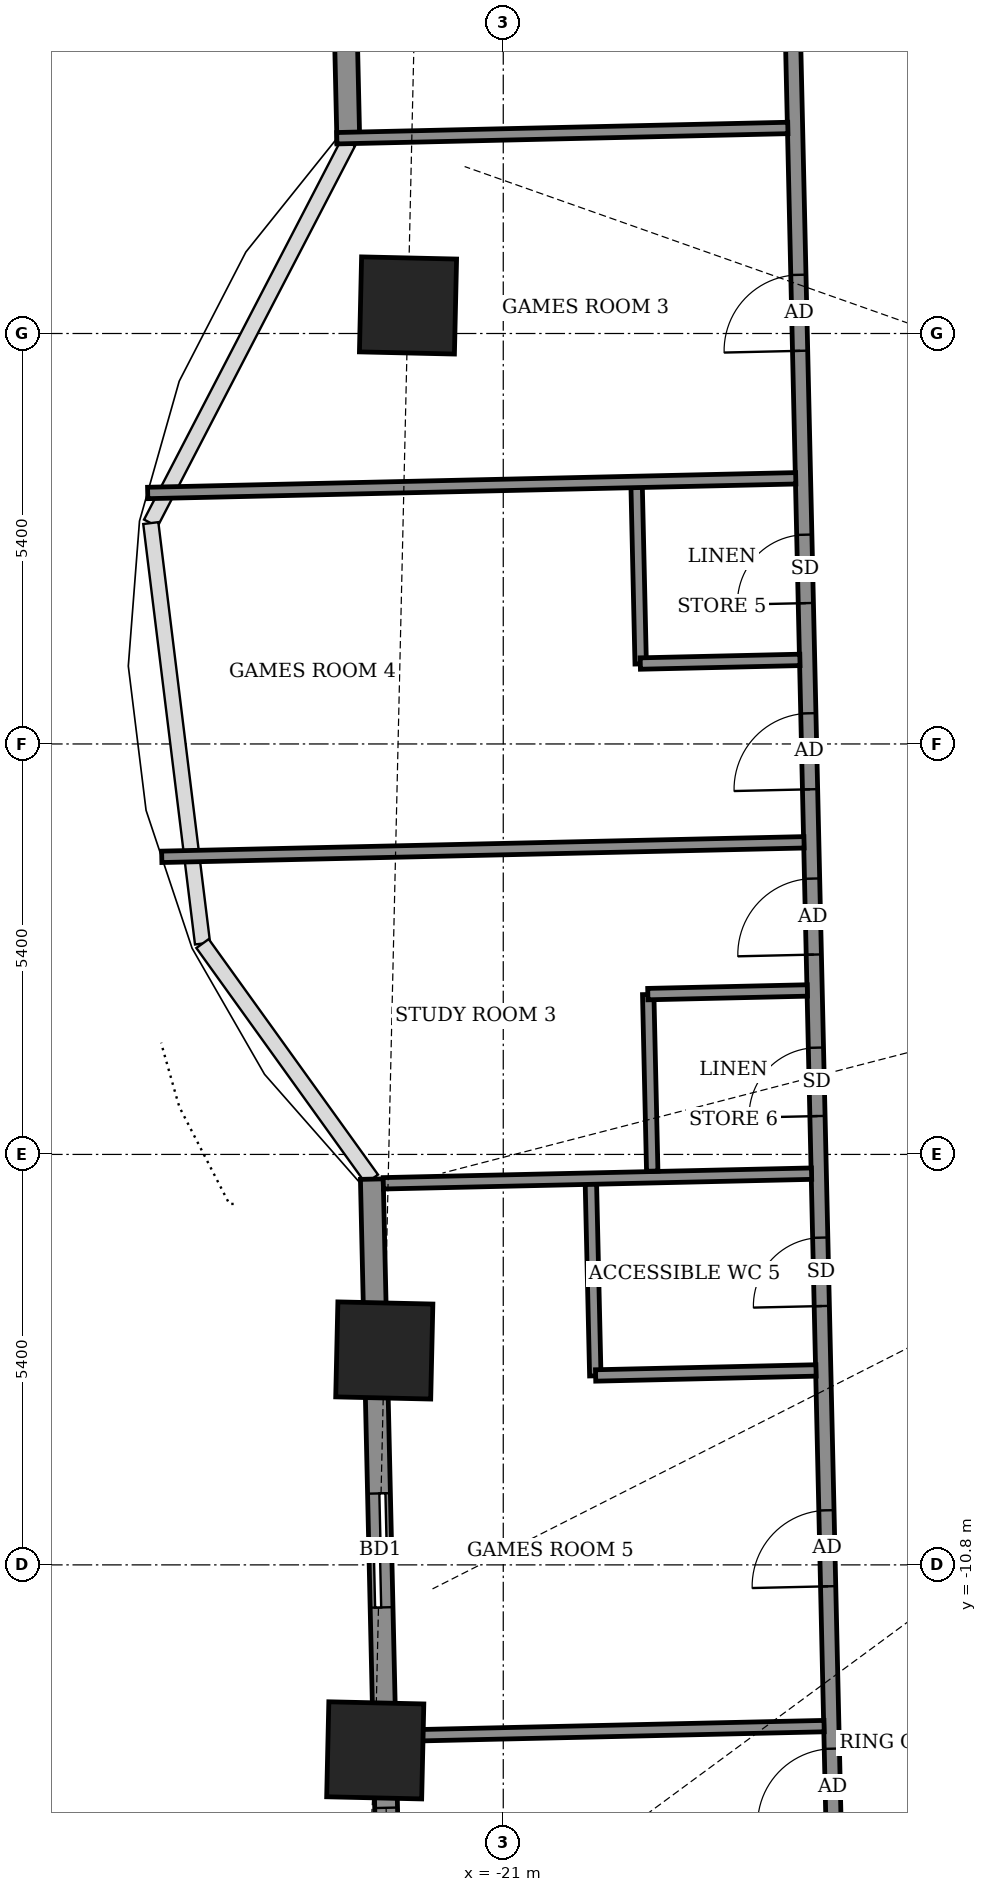
"""IFC4 building model, lengths in metres.
Left out: names, types, materials, properties, quantities, classifications, styles, units other than length and angle.
Written with IfcOpenShell. Run it as: python <this file> out.ifc"""

import sys

from ifc_helpers import new_model, si_unit, direction, frame, frame_2d, origin, origin_2d, place, context, subcontext, project, spatial, rectangle, extrude, element, fill, save


model = new_model("IFC4")
c1 = context("Model", 3, precision=1e-05, world=origin(), true_north=direction((0.0, 1.0)))
c2 = subcontext(c1, "Body", "Model", "MODEL_VIEW")
j1 = project(units=[si_unit("LENGTHUNIT", "METRE"), si_unit("PLANEANGLEUNIT", "RADIAN")], contexts=[c1])
p1 = place(None, origin())
s1 = spatial("IfcSite", under=j1, at=p1, CompositionType="ELEMENT")
p2 = place(p1, origin())
s2 = spatial("IfcBuilding", under=s1, at=p2, CompositionType="ELEMENT")
p3 = place(p2, frame((0.0, 0.0, 170.7)))
s3 = spatial("IfcBuildingStorey", under=s2, at=p3, CompositionType="ELEMENT", Elevation=170.7)
for number, where, z_axis, x_axis in (
    (1, (-22.565, -7.979, -0.55), (0.0, 0.0, 1.0), (-0.023, -1.0, 0.0)),
    (2, (-22.684, -13.24, -0.55), (0.0, 0.0, 1.0), (-0.023, -1.0, 0.0)),
    (3, (-22.253, 5.769, -0.55), (0.0, 0.0, 1.0), (-0.023, -1.0, 0.0)),
):
    element("IfcColumn", number, at=place(p3, frame(where, z_axis=z_axis, x_axis=x_axis)), inside=s3, PredefinedType="COLUMN", context=c2, shape_type="SweptSolid", body=[
        extrude(rectangle(XDim=1.25, YDim=1.25, at=origin_2d()), origin(), (0.0, 0.0, 1.0), 4.6),
    ])
p4 = place(p3, frame((-23.275, 18.34, 0.0), z_axis=(0.0, 0.0, 1.0), x_axis=(0.022705985163, -0.999742185885, 0.0)))
e4 = element("IfcWall", 4, at=p4, inside=s3, PredefinedType="SOLIDWALL", context=c2, shape_type="SweptSolid", body=[
    extrude(rectangle(XDim=10.43, YDim=0.3, at=frame_2d((5.215, 0.0))), origin(), (0.0, 0.0, 1.0), 2.85),
])
p5 = place(p4, frame((0.312, 0.0, 0.0)))
e5 = element("IfcOpeningElement", 5, at=p5, cuts=e4, PredefinedType="OPENING", context=c2, shape_type="SweptSolid", body=[
    extrude(rectangle(XDim=1.5, YDim=2.4, at=frame_2d((0.75, 1.2))), frame((0.0, 0.16, 0.0), z_axis=(0.0, -1.0, 0.0), x_axis=(1.0, 0.0, 0.0)), (0.0, 0.0, 1.0), 0.32),
])
p6 = place(p4, frame((4.136, 0.0, 0.9)))
e6 = element("IfcOpeningElement", 6, at=p6, cuts=e4, PredefinedType="OPENING", context=c2, shape_type="SweptSolid", body=[
    extrude(rectangle(XDim=2.4, YDim=1.5, at=frame_2d((1.2, 0.75))), frame((0.0, 0.16, 0.0), z_axis=(0.0, -1.0, 0.0), x_axis=(1.0, 0.0, 0.0)), (0.0, 0.0, 1.0), 0.32),
])
p7 = place(p3, frame((-22.729, -5.725, 0.0), z_axis=(0.0, 0.0, 1.0), x_axis=(0.022726014582, -0.999741730779, 0.0)))
e7 = element("IfcWall", 7, at=p7, inside=s3, PredefinedType="SOLIDWALL", context=c2, shape_type="SweptSolid", body=[
    extrude(rectangle(XDim=10.829, YDim=0.3, at=frame_2d((5.414, 0.0))), origin(), (0.0, 0.0, 1.0), 2.75),
])
p8 = place(p7, frame((4.136, 0.0, 0.0)))
e8 = element("IfcOpeningElement", 8, at=p8, cuts=e7, PredefinedType="OPENING", context=c2, shape_type="SweptSolid", body=[
    extrude(rectangle(XDim=1.5, YDim=2.4, at=frame_2d((0.75, 1.2))), frame((0.0, 0.16, 0.0), z_axis=(0.0, -1.0, 0.0), x_axis=(1.0, 0.0, 0.0)), (0.0, 0.0, 1.0), 0.32),
])
p9 = place(p7, frame((8.273, 0.0, 0.9)))
e9 = element("IfcOpeningElement", 9, at=p9, cuts=e7, PredefinedType="OPENING", context=c2, shape_type="SweptSolid", body=[
    extrude(rectangle(XDim=2.4, YDim=1.5, at=frame_2d((1.2, 0.75))), frame((0.0, 0.16, 0.0), z_axis=(0.0, -1.0, 0.0), x_axis=(1.0, 0.0, 0.0)), (0.0, 0.0, 1.0), 0.32),
])
p10 = place(p3, frame((-25.421, -8.966, 0.0), z_axis=(0.0, 0.0, 1.0), x_axis=(-0.022675106248, 0.999742886725, 0.0)))
e10 = element("IfcWall", 10, at=p10, inside=s3, PredefinedType="USERDEFINED", context=c2, shape_type="SweptSolid", body=[
    extrude(rectangle(XDim=2.875, YDim=0.55, at=frame_2d((1.438, 0.0))), origin(), (0.0, 0.0, 1.0), 0.8),
])
p11 = place(p3, frame((-16.65, -14.418, 0.0), z_axis=(0.0, 0.0, 1.0), x_axis=(-0.022695485329, 0.9997424243, 0.0)))
e11 = element("IfcWall", 11, at=p11, inside=s3, PredefinedType="PARTITIONING", context=c2, shape_type="SweptSolid", body=[
    extrude(rectangle(XDim=31.024, YDim=0.2, at=frame_2d((15.512, 0.0))), origin(), (0.0, 0.0, 1.0), 2.75),
])
p12 = place(p11, frame((0.2, 0.0, 0.0)))
e12 = element("IfcOpeningElement", 12, at=p12, cuts=e11, PredefinedType="OPENING", context=c2, shape_type="SweptSolid", body=[
    extrude(rectangle(XDim=1.0, YDim=2.1, at=frame_2d((0.5, 1.05))), frame((0.0, 0.11, 0.0), z_axis=(0.0, -1.0, 0.0), x_axis=(1.0, 0.0, 0.0)), (0.0, 0.0, 1.0), 0.22),
])
p13 = place(p11, frame((25.525, 0.0, 0.0)))
e13 = element("IfcOpeningElement", 13, at=p13, cuts=e11, PredefinedType="OPENING", context=c2, shape_type="SweptSolid", body=[
    extrude(rectangle(XDim=1.0, YDim=2.1, at=frame_2d((0.5, 1.05))), frame((0.0, 0.11, 0.0), z_axis=(0.0, -1.0, 0.0), x_axis=(1.0, 0.0, 0.0)), (0.0, 0.0, 1.0), 0.22),
])
p14 = place(p11, frame((19.595, 0.0, 0.0)))
e14 = element("IfcOpeningElement", 14, at=p14, cuts=e11, PredefinedType="OPENING", context=c2, shape_type="SweptSolid", body=[
    extrude(rectangle(XDim=1.0, YDim=2.1, at=frame_2d((0.5, 1.05))), frame((0.0, 0.11, 0.0), z_axis=(0.0, -1.0, 0.0), x_axis=(1.0, 0.0, 0.0)), (0.0, 0.0, 1.0), 0.22),
])
p15 = place(p11, frame((13.825, 0.0, 0.0)))
e15 = element("IfcOpeningElement", 15, at=p15, cuts=e11, PredefinedType="OPENING", context=c2, shape_type="SweptSolid", body=[
    extrude(rectangle(XDim=1.0, YDim=2.1, at=frame_2d((0.5, 1.05))), frame((0.0, 0.11, 0.0), z_axis=(0.0, -1.0, 0.0), x_axis=(1.0, 0.0, 0.0)), (0.0, 0.0, 1.0), 0.22),
])
p16 = place(p11, frame((16.275, 0.0, 0.0)))
e16 = element("IfcOpeningElement", 16, at=p16, cuts=e11, PredefinedType="OPENING", context=c2, shape_type="SweptSolid", body=[
    extrude(rectangle(XDim=0.9, YDim=2.1, at=frame_2d((0.45, 1.05))), frame((0.0, 0.11, 0.0), z_axis=(0.0, -1.0, 0.0), x_axis=(1.0, 0.0, 0.0)), (0.0, 0.0, 1.0), 0.22),
])
p17 = place(p11, frame((11.65, 0.0, 0.0)))
e17 = element("IfcOpeningElement", 17, at=p17, cuts=e11, PredefinedType="OPENING", context=c2, shape_type="SweptSolid", body=[
    extrude(rectangle(XDim=1.0, YDim=2.1, at=frame_2d((0.5, 1.05))), frame((0.0, 0.11, 0.0), z_axis=(0.0, -1.0, 0.0), x_axis=(1.0, 0.0, 0.0)), (0.0, 0.0, 1.0), 0.22),
])
p18 = place(p11, frame((9.525, 0.0, 0.0)))
e18 = element("IfcOpeningElement", 18, at=p18, cuts=e11, PredefinedType="OPENING", context=c2, shape_type="SweptSolid", body=[
    extrude(rectangle(XDim=0.9, YDim=2.1, at=frame_2d((0.45, 1.05))), frame((0.0, 0.11, 0.0), z_axis=(0.0, -1.0, 0.0), x_axis=(1.0, 0.0, 0.0)), (0.0, 0.0, 1.0), 0.22),
])
p19 = place(p11, frame((3.337, 0.0, 0.0)))
e19 = element("IfcOpeningElement", 19, at=p19, cuts=e11, PredefinedType="OPENING", context=c2, shape_type="SweptSolid", body=[
    extrude(rectangle(XDim=1.0, YDim=2.1, at=frame_2d((0.5, 1.05))), frame((0.0, 0.11, 0.0), z_axis=(0.0, -1.0, 0.0), x_axis=(1.0, 0.0, 0.0)), (0.0, 0.0, 1.0), 0.22),
])
p20 = place(p11, frame((7.025, 0.0, 0.0)))
e20 = element("IfcOpeningElement", 20, at=p20, cuts=e11, PredefinedType="OPENING", context=c2, shape_type="SweptSolid", body=[
    extrude(rectangle(XDim=0.9, YDim=2.1, at=frame_2d((0.45, 1.05))), frame((0.0, 0.11, 0.0), z_axis=(0.0, -1.0, 0.0), x_axis=(1.0, 0.0, 0.0)), (0.0, 0.0, 1.0), 0.22),
])
p21 = place(p3, frame((-16.645, -14.418, 0.0), z_axis=(0.0, 0.0, 1.0), x_axis=(0.999742564802, 0.022689295346, 0.0)))
e21 = element("IfcWall", 21, at=p21, inside=s3, PredefinedType="PARTITIONING", context=c2, shape_type="SweptSolid", body=[
    extrude(rectangle(XDim=40.587, YDim=0.2, at=frame_2d((20.294, 0.0))), origin(), (0.0, 0.0, 1.0), 2.55),
])
p22 = place(p21, frame((4.965, 0.0, 0.0)))
e22 = element("IfcOpeningElement", 22, at=p22, cuts=e21, PredefinedType="OPENING", context=c2, shape_type="SweptSolid", body=[
    extrude(rectangle(XDim=0.9, YDim=2.1, at=frame_2d((0.45, 1.05))), frame((0.0, 0.11, 0.0), z_axis=(0.0, -1.0, 0.0), x_axis=(1.0, 0.0, 0.0)), (0.0, 0.0, 1.0), 0.22),
])
p23 = place(p21, frame((10.44, 0.0, 0.0)))
e23 = element("IfcOpeningElement", 23, at=p23, cuts=e21, PredefinedType="OPENING", context=c2, shape_type="SweptSolid", body=[
    extrude(rectangle(XDim=1.0, YDim=2.1, at=frame_2d((0.5, 1.05))), frame((0.0, 0.11, 0.0), z_axis=(0.0, -1.0, 0.0), x_axis=(1.0, 0.0, 0.0)), (0.0, 0.0, 1.0), 0.22),
])
p24 = place(p21, frame((7.465, 0.0, 0.0)))
e24 = element("IfcOpeningElement", 24, at=p24, cuts=e21, PredefinedType="OPENING", context=c2, shape_type="SweptSolid", body=[
    extrude(rectangle(XDim=0.9, YDim=2.1, at=frame_2d((0.45, 1.05))), frame((0.0, 0.11, 0.0), z_axis=(0.0, -1.0, 0.0), x_axis=(1.0, 0.0, 0.0)), (0.0, 0.0, 1.0), 0.22),
])
p25 = place(p21, frame((13.515, 0.0, 0.0)))
e25 = element("IfcOpeningElement", 25, at=p25, cuts=e21, PredefinedType="OPENING", context=c2, shape_type="SweptSolid", body=[
    extrude(rectangle(XDim=0.9, YDim=2.1, at=frame_2d((0.45, 1.05))), frame((0.0, 0.11, 0.0), z_axis=(0.0, -1.0, 0.0), x_axis=(1.0, 0.0, 0.0)), (0.0, 0.0, 1.0), 0.22),
])
p26 = place(p21, frame((20.915, 0.0, 0.0)))
e26 = element("IfcOpeningElement", 26, at=p26, cuts=e21, PredefinedType="OPENING", context=c2, shape_type="SweptSolid", body=[
    extrude(rectangle(XDim=0.9, YDim=2.1, at=frame_2d((0.45, 1.05))), frame((0.0, 0.11, 0.0), z_axis=(0.0, -1.0, 0.0), x_axis=(1.0, 0.0, 0.0)), (0.0, 0.0, 1.0), 0.22),
])
p27 = place(p21, frame((23.24, 0.0, 0.0)))
e27 = element("IfcOpeningElement", 27, at=p27, cuts=e21, PredefinedType="OPENING", context=c2, shape_type="SweptSolid", body=[
    extrude(rectangle(XDim=1.0, YDim=2.1, at=frame_2d((0.5, 1.05))), frame((0.0, 0.11, 0.0), z_axis=(0.0, -1.0, 0.0), x_axis=(1.0, 0.0, 0.0)), (0.0, 0.0, 1.0), 0.22),
])
p28 = place(p21, frame((25.665, 0.0, 0.0)))
e28 = element("IfcOpeningElement", 28, at=p28, cuts=e21, PredefinedType="OPENING", context=c2, shape_type="SweptSolid", body=[
    extrude(rectangle(XDim=0.9, YDim=2.1, at=frame_2d((0.45, 1.05))), frame((0.0, 0.11, 0.0), z_axis=(0.0, -1.0, 0.0), x_axis=(1.0, 0.0, 0.0)), (0.0, 0.0, 1.0), 0.22),
])
p29 = place(p21, frame((31.265, 0.0, 0.0)))
e29 = element("IfcOpeningElement", 29, at=p29, cuts=e21, PredefinedType="OPENING", context=c2, shape_type="SweptSolid", body=[
    extrude(rectangle(XDim=1.0, YDim=2.1, at=frame_2d((0.5, 1.05))), frame((0.0, 0.11, 0.0), z_axis=(0.0, -1.0, 0.0), x_axis=(1.0, 0.0, 0.0)), (0.0, 0.0, 1.0), 0.22),
])
p30 = place(p21, frame((28.265, 0.0, 0.0)))
e30 = element("IfcOpeningElement", 30, at=p30, cuts=e21, PredefinedType="OPENING", context=c2, shape_type="SweptSolid", body=[
    extrude(rectangle(XDim=0.9, YDim=2.1, at=frame_2d((0.45, 1.05))), frame((0.0, 0.11, 0.0), z_axis=(0.0, -1.0, 0.0), x_axis=(1.0, 0.0, 0.0)), (0.0, 0.0, 1.0), 0.22),
])
p31 = place(p21, frame((39.18, 0.0, 0.0)))
e31 = element("IfcOpeningElement", 31, at=p31, cuts=e21, PredefinedType="OPENING", context=c2, shape_type="SweptSolid", body=[
    extrude(rectangle(XDim=1.0, YDim=2.1, at=frame_2d((0.5, 1.05))), frame((0.0, 0.11, 0.0), z_axis=(0.0, -1.0, 0.0), x_axis=(1.0, 0.0, 0.0)), (0.0, 0.0, 1.0), 0.22),
])
p32 = place(p21, frame((34.365, 0.0, 0.0)))
e32 = element("IfcOpeningElement", 32, at=p32, cuts=e21, PredefinedType="OPENING", context=c2, shape_type="SweptSolid", body=[
    extrude(rectangle(XDim=0.9, YDim=2.1, at=frame_2d((0.45, 1.05))), frame((0.0, 0.11, 0.0), z_axis=(0.0, -1.0, 0.0), x_axis=(1.0, 0.0, 0.0)), (0.0, 0.0, 1.0), 0.22),
])
p33 = place(p3, frame((-22.713, -13.055, 0.0), z_axis=(0.0, 0.0, 1.0), x_axis=(0.999744989952, 0.022582184714, 0.0)))
e33 = element("IfcWall", 33, at=p33, inside=s3, PredefinedType="PARTITIONING", context=c2, shape_type="SweptSolid", body=[
    extrude(rectangle(XDim=5.935, YDim=0.15, at=frame_2d((2.968, 0.0))), origin(), (0.0, 0.0, 1.0), 2.85),
])
p34 = place(p3, frame((-19.789, -8.313, 0.0), z_axis=(0.0, 0.0, 1.0), x_axis=(-0.022910248851, 0.999737525802, 0.0)))
e34 = element("IfcWall", 34, at=p34, inside=s3, PredefinedType="PARTITIONING", context=c2, shape_type="SweptSolid", body=[
    extrude(rectangle(XDim=2.526, YDim=0.15, at=frame_2d((1.263, 0.0))), origin(), (0.0, 0.0, 1.0), 2.85),
])
p35 = place(p3, frame((-19.785, -8.308, 0.0), z_axis=(0.0, 0.0, 1.0), x_axis=(0.999739832865, 0.022809352981, 0.0)))
e35 = element("IfcWall", 35, at=p35, inside=s3, PredefinedType="PARTITIONING", context=c2, shape_type="SweptSolid", body=[
    extrude(rectangle(XDim=2.901, YDim=0.15, at=frame_2d((1.45, 0.0))), origin(), (0.0, 0.0, 1.0), 2.85),
])
p36 = place(p3, frame((-22.578, -5.78, 0.0), z_axis=(0.0, 0.0, 1.0), x_axis=(0.999746200787, 0.022528515532, 0.0)))
e36 = element("IfcWall", 36, at=p36, inside=s3, PredefinedType="PARTITIONING", context=c2, shape_type="SweptSolid", body=[
    extrude(rectangle(XDim=5.635, YDim=0.15, at=frame_2d((2.818, 0.0))), origin(), (0.0, 0.0, 1.0), 2.75),
])
p37 = place(p3, frame((-19.04, -5.62, 0.0), z_axis=(0.0, 0.0, 1.0), x_axis=(-0.022788198363, 0.99974031529, 0.0)))
e37 = element("IfcWall", 37, at=p37, inside=s3, PredefinedType="PARTITIONING", context=c2, shape_type="SweptSolid", body=[
    extrude(rectangle(XDim=2.325, YDim=0.15, at=frame_2d((1.162, 0.0))), origin(), (0.0, 0.0, 1.0), 2.85),
])
p38 = place(p3, frame((-19.098, -3.291, 0.0), z_axis=(0.0, 0.0, 1.0), x_axis=(0.999737555419, 0.022908956429, 0.0)))
e38 = element("IfcWall", 38, at=p38, inside=s3, PredefinedType="PARTITIONING", context=c2, shape_type="SweptSolid", body=[
    extrude(rectangle(XDim=2.099, YDim=0.15, at=frame_2d((1.05, 0.0))), origin(), (0.0, 0.0, 1.0), 4.05),
])
p39 = place(p3, frame((-25.493, -1.485, 0.0), z_axis=(0.0, 0.0, 1.0), x_axis=(0.99974420116, 0.02261707866, 0.0)))
e39 = element("IfcWall", 39, at=p39, inside=s3, PredefinedType="PARTITIONING", context=c2, shape_type="SweptSolid", body=[
    extrude(rectangle(XDim=8.452, YDim=0.15, at=frame_2d((4.226, 0.0))), origin(), (0.0, 0.0, 1.0), 0.93),
])
p40 = place(p3, frame((-19.192, 1.053, 0.0), z_axis=(0.0, 0.0, 1.0), x_axis=(-0.022885950011, 0.999738082346, 0.0)))
e40 = element("IfcWall", 40, at=p40, inside=s3, PredefinedType="PARTITIONING", context=c2, shape_type="SweptSolid", body=[
    extrude(rectangle(XDim=2.325, YDim=0.15, at=frame_2d((1.163, 0.0))), origin(), (0.0, 0.0, 1.0), 4.05),
])
p41 = place(p3, frame((-19.197, 1.058, 0.0), z_axis=(0.0, 0.0, 1.0), x_axis=(0.999740513837, 0.022779486249, 0.0)))
e41 = element("IfcWall", 41, at=p41, inside=s3, PredefinedType="PARTITIONING", context=c2, shape_type="SweptSolid", body=[
    extrude(rectangle(XDim=2.101, YDim=0.15, at=frame_2d((1.05, 0.0))), origin(), (0.0, 0.0, 1.0), 4.05),
])
p42 = place(p3, frame((-25.678, 3.302, 0.0), z_axis=(0.0, 0.0, 1.0), x_axis=(0.999743576582, 0.022644670096, 0.0)))
e42 = element("IfcWall", 42, at=p42, inside=s3, PredefinedType="PARTITIONING", context=c2, shape_type="SweptSolid", body=[
    extrude(rectangle(XDim=8.528, YDim=0.15, at=frame_2d((4.264, 0.0))), origin(), (0.0, 0.0, 1.0), 0.93),
])
p43 = place(p3, frame((-23.19, 7.969, 0.0), z_axis=(0.0, 0.0, 1.0), x_axis=(0.999741261868, 0.022746633113, 0.0)))
e43 = element("IfcWall", 43, at=p43, inside=s3, PredefinedType="PARTITIONING", context=c2, shape_type="SweptSolid", body=[
    extrude(rectangle(XDim=5.935, YDim=0.15, at=frame_2d((2.968, 0.0))), origin(), (0.0, 0.0, 1.0), 2.75),
])
p44 = place(p8, origin())
e44 = element("IfcDoor", 44, at=p44, inside=s3, OperationType="SLIDING_TO_LEFT", PredefinedType="DOOR", context=c2, shape_type="SweptSolid", body=[
    extrude(rectangle(XDim=1.5, YDim=2.4, at=frame_2d((0.75, 1.2))), frame((0.0, 0.025, 0.0), z_axis=(0.0, -1.0, 0.0), x_axis=(1.0, 0.0, 0.0)), (0.0, 0.0, 1.0), 0.05),
])
fill(e8, e44)
p45 = place(p9, origin())
e45 = element("IfcWindow", 45, at=p45, inside=s3, PartitioningType="DOUBLE_PANEL_VERTICAL", PredefinedType="WINDOW", context=c2, shape_type="SweptSolid", body=[
    extrude(rectangle(XDim=2.4, YDim=1.5, at=frame_2d((1.2, 0.75))), frame((0.0, 0.03, 0.0), z_axis=(0.0, -1.0, 0.0), x_axis=(1.0, 0.0, 0.0)), (0.0, 0.0, 1.0), 0.06),
])
fill(e9, e45)
p46 = place(p12, origin())
e46 = element("IfcDoor", 46, at=p46, inside=s3, OperationType="SINGLE_SWING_LEFT", PredefinedType="DOOR", context=c2, shape_type="SweptSolid", body=[
    extrude(rectangle(XDim=1.0, YDim=2.1, at=frame_2d((0.5, 1.05))), frame((0.0, 0.025, 0.0), z_axis=(0.0, -1.0, 0.0), x_axis=(1.0, 0.0, 0.0)), (0.0, 0.0, 1.0), 0.05),
])
fill(e12, e46)
p47 = place(p14, origin())
e47 = element("IfcDoor", 47, at=p47, inside=s3, OperationType="SINGLE_SWING_LEFT", PredefinedType="DOOR", context=c2, shape_type="SweptSolid", body=[
    extrude(rectangle(XDim=1.0, YDim=2.1, at=frame_2d((0.5, 1.05))), frame((0.0, 0.025, 0.0), z_axis=(0.0, -1.0, 0.0), x_axis=(1.0, 0.0, 0.0)), (0.0, 0.0, 1.0), 0.05),
])
fill(e14, e47)
p48 = place(p15, origin())
e48 = element("IfcDoor", 48, at=p48, inside=s3, OperationType="SINGLE_SWING_RIGHT", PredefinedType="DOOR", context=c2, shape_type="SweptSolid", body=[
    extrude(rectangle(XDim=1.0, YDim=2.1, at=frame_2d((0.5, 1.05))), frame((0.0, 0.025, 0.0), z_axis=(0.0, -1.0, 0.0), x_axis=(1.0, 0.0, 0.0)), (0.0, 0.0, 1.0), 0.05),
])
fill(e15, e48)
p49 = place(p16, origin())
e49 = element("IfcDoor", 49, at=p49, inside=s3, OperationType="SINGLE_SWING_RIGHT", PredefinedType="DOOR", context=c2, shape_type="SweptSolid", body=[
    extrude(rectangle(XDim=0.9, YDim=2.1, at=frame_2d((0.45, 1.05))), frame((0.0, 0.025, 0.0), z_axis=(0.0, -1.0, 0.0), x_axis=(1.0, 0.0, 0.0)), (0.0, 0.0, 1.0), 0.05),
])
fill(e16, e49)
p50 = place(p17, origin())
e50 = element("IfcDoor", 50, at=p50, inside=s3, OperationType="SINGLE_SWING_LEFT", PredefinedType="DOOR", context=c2, shape_type="SweptSolid", body=[
    extrude(rectangle(XDim=1.0, YDim=2.1, at=frame_2d((0.5, 1.05))), frame((0.0, 0.025, 0.0), z_axis=(0.0, -1.0, 0.0), x_axis=(1.0, 0.0, 0.0)), (0.0, 0.0, 1.0), 0.05),
])
fill(e17, e50)
p51 = place(p18, origin())
e51 = element("IfcDoor", 51, at=p51, inside=s3, OperationType="SINGLE_SWING_LEFT", PredefinedType="DOOR", context=c2, shape_type="SweptSolid", body=[
    extrude(rectangle(XDim=0.9, YDim=2.1, at=frame_2d((0.45, 1.05))), frame((0.0, 0.025, 0.0), z_axis=(0.0, -1.0, 0.0), x_axis=(1.0, 0.0, 0.0)), (0.0, 0.0, 1.0), 0.05),
])
fill(e18, e51)
p52 = place(p19, origin())
e52 = element("IfcDoor", 52, at=p52, inside=s3, OperationType="SINGLE_SWING_RIGHT", PredefinedType="DOOR", context=c2, shape_type="SweptSolid", body=[
    extrude(rectangle(XDim=1.0, YDim=2.1, at=frame_2d((0.5, 1.05))), frame((0.0, 0.025, 0.0), z_axis=(0.0, -1.0, 0.0), x_axis=(1.0, 0.0, 0.0)), (0.0, 0.0, 1.0), 0.05),
])
fill(e19, e52)
p53 = place(p20, origin())
e53 = element("IfcDoor", 53, at=p53, inside=s3, OperationType="SINGLE_SWING_RIGHT", PredefinedType="DOOR", context=c2, shape_type="SweptSolid", body=[
    extrude(rectangle(XDim=0.9, YDim=2.1, at=frame_2d((0.45, 1.05))), frame((0.0, 0.025, 0.0), z_axis=(0.0, -1.0, 0.0), x_axis=(1.0, 0.0, 0.0)), (0.0, 0.0, 1.0), 0.05),
])
fill(e20, e53)
save(model, sys.argv[1])
